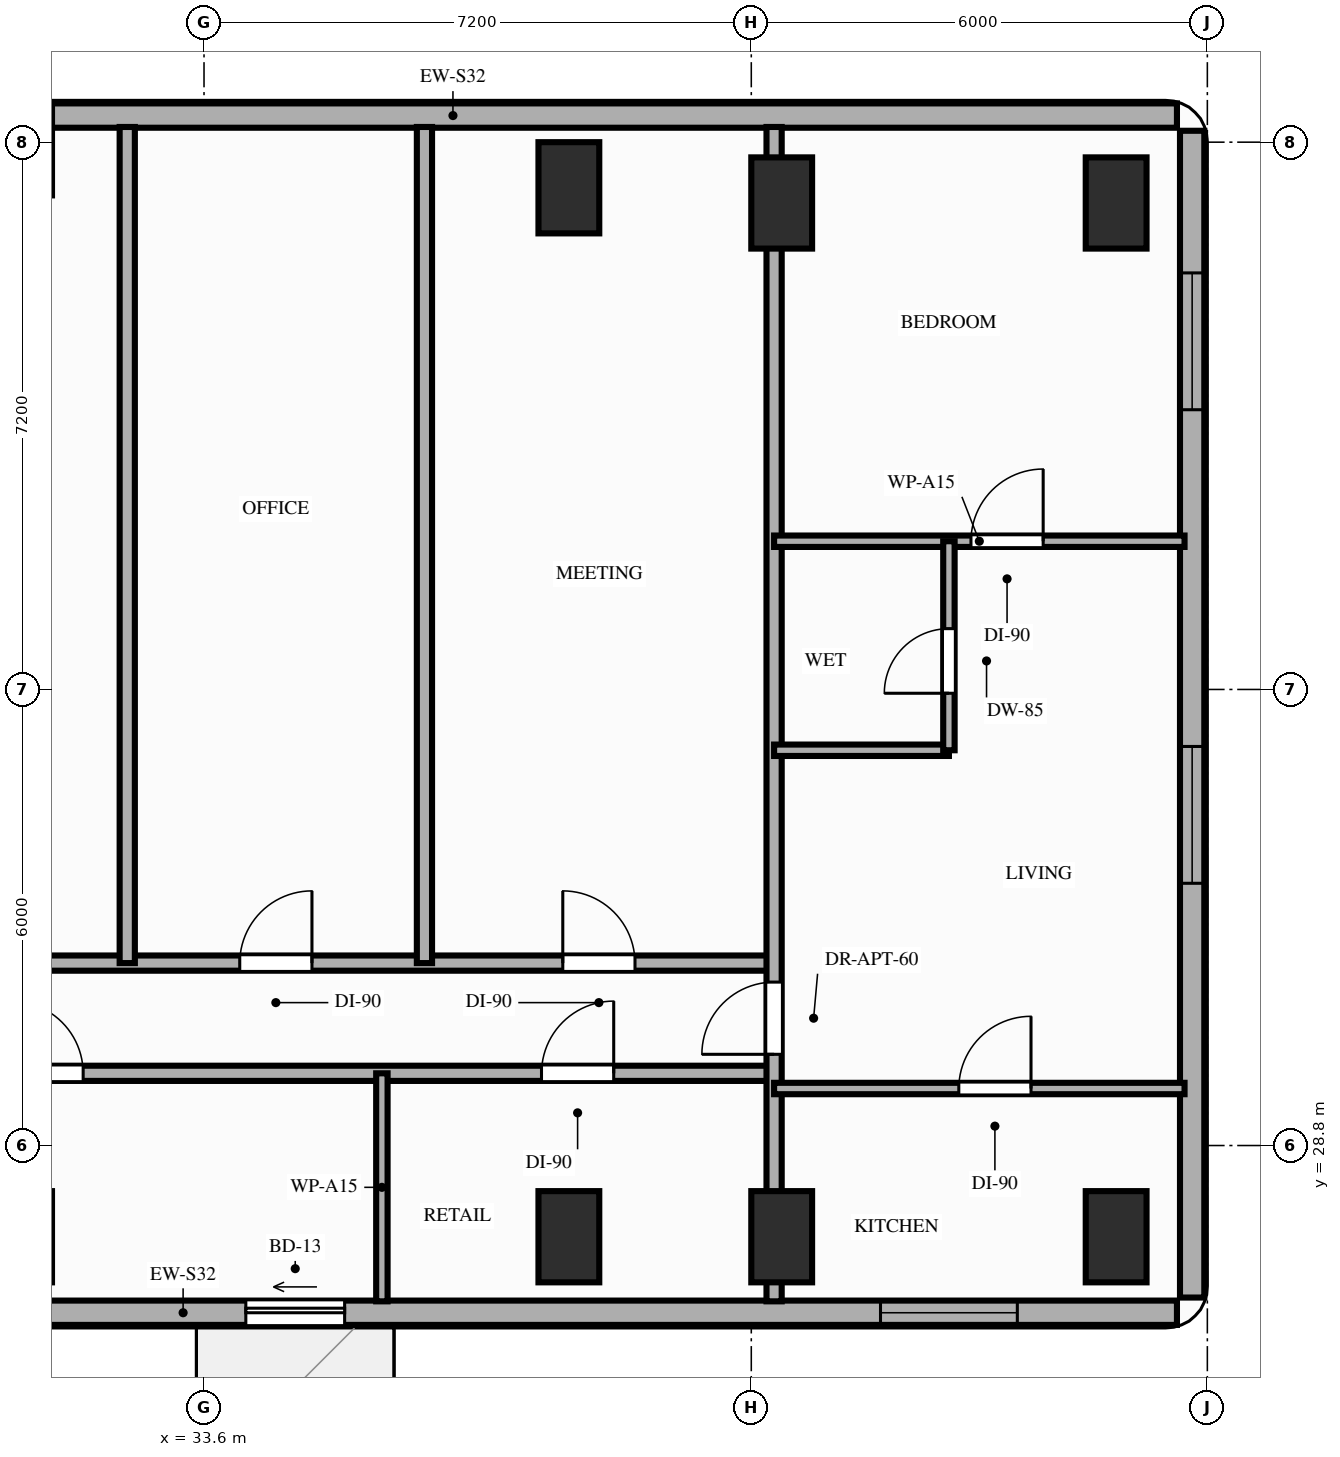
"""IFC4 building model, lengths in metres.
Left out: names, types, materials, properties, quantities, classifications, styles, units other than length and angle.
Written with IfcOpenShell. Run it as: python <this file> out.ifc"""

import sys

from ifc_helpers import new_model, si_unit, direction, frame, frame_2d, origin, origin_2d, place, context, subcontext, project, spatial, rectangle, extrude, element, fill, save


model = new_model("IFC4")
c1 = context("Model", 3, precision=1e-05, world=origin(), true_north=direction((0.0, 1.0)))
c2 = subcontext(c1, "Body", "Model", "MODEL_VIEW")
j1 = project(units=[si_unit("LENGTHUNIT", "METRE"), si_unit("PLANEANGLEUNIT", "RADIAN")], contexts=[c1])
p1 = place(None, origin())
s1 = spatial("IfcSite", under=j1, at=p1, CompositionType="ELEMENT")
p2 = place(p1, origin())
s2 = spatial("IfcBuilding", under=s1, at=p2, CompositionType="ELEMENT")
p3 = place(p2, frame((0.0, 0.0, 96.2)))
s3 = spatial("IfcBuildingStorey", under=s2, at=p3, CompositionType="ELEMENT", Elevation=96.2)
for number, where, z_axis, x_axis in (
    (1, (38.4, 27.6, 0.0), (0.0, 0.0, 1.0), (1.0, 0.0, 0.0)),
    (2, (38.4, 41.4, 0.0), (0.0, 0.0, 1.0), (1.0, 0.0, 0.0)),
    (3, (41.2, 27.6, 0.0), (0.0, 0.0, 1.0), (1.0, 0.0, 0.0)),
    (4, (41.2, 41.2, 0.0), (0.0, 0.0, 1.0), (1.0, 0.0, 0.0)),
    (5, (45.6, 27.6, 0.0), (0.0, 0.0, 1.0), (1.0, 0.0, 0.0)),
    (6, (45.6, 41.2, 0.0), (0.0, 0.0, 1.0), (1.0, 0.0, 0.0)),
):
    element("IfcColumn", number, at=place(p3, frame(where, z_axis=z_axis, x_axis=x_axis)), inside=s3, PredefinedType="COLUMN", context=c2, shape_type="SweptSolid", body=[
        extrude(rectangle(XDim=0.8, YDim=1.2, at=origin_2d()), origin(), (0.0, 0.0, 1.0), 3.2),
    ])
p4 = place(p3, frame((46.4, 42.35, 0.0), z_axis=(0.0, 0.0, 1.0), x_axis=(-1.0, 0.0, 0.0)))
e7 = element("IfcWall", 7, at=p4, inside=s3, PredefinedType="STANDARD", context=c2, shape_type="SweptSolid", body=[
    extrude(rectangle(XDim=19.05, YDim=0.32, at=frame_2d((9.525, 0.0))), origin(), (0.0, 0.0, 1.0), 2.41),
])
p5 = place(p3, frame((20.25, 26.6, 0.0), z_axis=(0.0, 0.0, 1.0), x_axis=(1.0, 0.0, 0.0)))
e8 = element("IfcWall", 8, at=p5, inside=s3, PredefinedType="STANDARD", context=c2, shape_type="SweptSolid", body=[
    extrude(rectangle(XDim=26.15, YDim=0.32, at=frame_2d((13.075, 0.0))), origin(), (0.0, 0.0, 1.0), 2.71),
])
p6 = place(p5, frame((13.9, 0.0, 0.0)))
e9 = element("IfcOpeningElement", 9, at=p6, cuts=e8, PredefinedType="OPENING", context=c2, shape_type="SweptSolid", body=[
    extrude(rectangle(XDim=1.3, YDim=2.08, at=frame_2d((0.65, 1.04))), frame((0.0, 0.17, 0.0), z_axis=(0.0, -1.0, 0.0), x_axis=(1.0, 0.0, 0.0)), (0.0, 0.0, 1.0), 0.34),
])
p7 = place(p5, frame((2.25, 0.0, 0.85)))
e10 = element("IfcOpeningElement", 10, at=p7, cuts=e8, PredefinedType="OPENING", context=c2, shape_type="SweptSolid", body=[
    extrude(rectangle(XDim=1.8, YDim=1.61, at=frame_2d((0.9, 0.805))), frame((0.0, 0.17, 0.0), z_axis=(0.0, -1.0, 0.0), x_axis=(1.0, 0.0, 0.0)), (0.0, 0.0, 1.0), 0.34),
])
p8 = place(p5, frame((7.75, 0.0, 0.85)))
e11 = element("IfcOpeningElement", 11, at=p8, cuts=e8, PredefinedType="OPENING", context=c2, shape_type="SweptSolid", body=[
    extrude(rectangle(XDim=1.8, YDim=1.61, at=frame_2d((0.9, 0.805))), frame((0.0, 0.17, 0.0), z_axis=(0.0, -1.0, 0.0), x_axis=(1.0, 0.0, 0.0)), (0.0, 0.0, 1.0), 0.34),
])
p9 = place(p5, frame((22.25, 0.0, 0.85)))
e12 = element("IfcOpeningElement", 12, at=p9, cuts=e8, PredefinedType="OPENING", context=c2, shape_type="SweptSolid", body=[
    extrude(rectangle(XDim=1.8, YDim=1.61, at=frame_2d((0.9, 0.805))), frame((0.0, 0.17, 0.0), z_axis=(0.0, -1.0, 0.0), x_axis=(1.0, 0.0, 0.0)), (0.0, 0.0, 1.0), 0.34),
])
p10 = place(p3, frame((46.6, 26.8, 0.0), z_axis=(0.0, 0.0, 1.0), x_axis=(0.0, 1.0, 0.0)))
e13 = element("IfcWall", 13, at=p10, inside=s3, PredefinedType="STANDARD", context=c2, shape_type="SweptSolid", body=[
    extrude(rectangle(XDim=15.35, YDim=0.32, at=frame_2d((7.675, 0.0))), origin(), (0.0, 0.0, 1.0), 3.02),
])
p11 = place(p10, frame((5.45, 0.0, 0.85)))
e14 = element("IfcOpeningElement", 14, at=p11, cuts=e13, PredefinedType="OPENING", context=c2, shape_type="SweptSolid", body=[
    extrude(rectangle(XDim=1.8, YDim=1.75, at=frame_2d((0.9, 0.875))), frame((0.0, 0.17, 0.0), z_axis=(0.0, -1.0, 0.0), x_axis=(1.0, 0.0, 0.0)), (0.0, 0.0, 1.0), 0.34),
])
p12 = place(p10, frame((11.68, 0.0, 0.85)))
e15 = element("IfcOpeningElement", 15, at=p12, cuts=e13, PredefinedType="OPENING", context=c2, shape_type="SweptSolid", body=[
    extrude(rectangle(XDim=1.8, YDim=1.75, at=frame_2d((0.9, 0.875))), frame((0.0, 0.17, 0.0), z_axis=(0.0, -1.0, 0.0), x_axis=(1.0, 0.0, 0.0)), (0.0, 0.0, 1.0), 0.34),
])
p13 = place(p3, frame((27.15, 29.75, 0.0), z_axis=(0.0, 0.0, 1.0), x_axis=(1.0, 0.0, 0.0)))
e16 = element("IfcWall", 16, at=p13, inside=s3, PredefinedType="PARTITIONING", context=c2, shape_type="SweptSolid", body=[
    extrude(rectangle(XDim=13.95, YDim=0.2, at=frame_2d((6.975, 0.0))), origin(), (0.0, 0.0, 1.0), 2.41),
])
p14 = place(p13, frame((3.91, 0.0, 0.0)))
e17 = element("IfcOpeningElement", 17, at=p14, cuts=e16, PredefinedType="OPENING", context=c2, shape_type="SweptSolid", body=[
    extrude(rectangle(XDim=0.95, YDim=2.15, at=frame_2d((0.475, 1.075))), frame((0.0, 0.11, 0.0), z_axis=(0.0, -1.0, 0.0), x_axis=(1.0, 0.0, 0.0)), (0.0, 0.0, 1.0), 0.22),
])
p15 = place(p13, frame((10.89, 0.0, 0.0)))
e18 = element("IfcOpeningElement", 18, at=p15, cuts=e16, PredefinedType="OPENING", context=c2, shape_type="SweptSolid", body=[
    extrude(rectangle(XDim=0.95, YDim=2.15, at=frame_2d((0.475, 1.075))), frame((0.0, 0.11, 0.0), z_axis=(0.0, -1.0, 0.0), x_axis=(1.0, 0.0, 0.0)), (0.0, 0.0, 1.0), 0.22),
])
p16 = place(p3, frame((27.15, 31.2, 0.0), z_axis=(0.0, 0.0, 1.0), x_axis=(1.0, 0.0, 0.0)))
e19 = element("IfcWall", 19, at=p16, inside=s3, PredefinedType="PARTITIONING", context=c2, shape_type="SweptSolid", body=[
    extrude(rectangle(XDim=13.95, YDim=0.2, at=frame_2d((6.975, 0.0))), origin(), (0.0, 0.0, 1.0), 2.41),
])
p17 = place(p16, frame((2.24, 0.0, 0.0)))
e20 = element("IfcOpeningElement", 20, at=p17, cuts=e19, PredefinedType="OPENING", context=c2, shape_type="SweptSolid", body=[
    extrude(rectangle(XDim=0.95, YDim=2.15, at=frame_2d((0.475, 1.075))), frame((0.0, 0.11, 0.0), z_axis=(0.0, -1.0, 0.0), x_axis=(1.0, 0.0, 0.0)), (0.0, 0.0, 1.0), 0.22),
])
p18 = place(p16, frame((6.92, 0.0, 0.0)))
e21 = element("IfcOpeningElement", 21, at=p18, cuts=e19, PredefinedType="OPENING", context=c2, shape_type="SweptSolid", body=[
    extrude(rectangle(XDim=0.95, YDim=2.15, at=frame_2d((0.475, 1.075))), frame((0.0, 0.11, 0.0), z_axis=(0.0, -1.0, 0.0), x_axis=(1.0, 0.0, 0.0)), (0.0, 0.0, 1.0), 0.22),
])
p19 = place(p16, frame((11.17, 0.0, 0.0)))
e22 = element("IfcOpeningElement", 22, at=p19, cuts=e19, PredefinedType="OPENING", context=c2, shape_type="SweptSolid", body=[
    extrude(rectangle(XDim=0.95, YDim=2.15, at=frame_2d((0.475, 1.075))), frame((0.0, 0.11, 0.0), z_axis=(0.0, -1.0, 0.0), x_axis=(1.0, 0.0, 0.0)), (0.0, 0.0, 1.0), 0.22),
])
p20 = place(p3, frame((41.1, 26.75, 0.0), z_axis=(0.0, 0.0, 1.0), x_axis=(0.0, 1.0, 0.0)))
e23 = element("IfcWall", 23, at=p20, inside=s3, PredefinedType="PARTITIONING", context=c2, shape_type="SweptSolid", body=[
    extrude(rectangle(XDim=15.45, YDim=0.2, at=frame_2d((7.725, 0.0))), origin(), (0.0, 0.0, 1.0), 2.41),
])
p21 = place(p20, frame((3.25, 0.0, 0.0)))
e24 = element("IfcOpeningElement", 24, at=p21, cuts=e23, PredefinedType="OPENING", context=c2, shape_type="SweptSolid", body=[
    extrude(rectangle(XDim=0.95, YDim=2.15, at=frame_2d((0.475, 1.075))), frame((0.0, 0.11, 0.0), z_axis=(0.0, -1.0, 0.0), x_axis=(1.0, 0.0, 0.0)), (0.0, 0.0, 1.0), 0.22),
])
p22 = place(p3, frame((41.1, 29.55, 0.0), z_axis=(0.0, 0.0, 1.0), x_axis=(1.0, 0.0, 0.0)))
e25 = element("IfcWall", 25, at=p22, inside=s3, PredefinedType="PARTITIONING", context=c2, shape_type="SweptSolid", body=[
    extrude(rectangle(XDim=5.4, YDim=0.15, at=frame_2d((2.7, 0.0))), origin(), (0.0, 0.0, 1.0), 2.41),
])
p23 = place(p22, frame((2.43, 0.0, 0.0)))
e26 = element("IfcOpeningElement", 26, at=p23, cuts=e25, PredefinedType="OPENING", context=c2, shape_type="SweptSolid", body=[
    extrude(rectangle(XDim=0.95, YDim=2.15, at=frame_2d((0.475, 1.075))), frame((0.0, 0.085, 0.0), z_axis=(0.0, -1.0, 0.0), x_axis=(1.0, 0.0, 0.0)), (0.0, 0.0, 1.0), 0.17),
])
p24 = place(p3, frame((41.1, 36.75, 0.0), z_axis=(0.0, 0.0, 1.0), x_axis=(1.0, 0.0, 0.0)))
e27 = element("IfcWall", 27, at=p24, inside=s3, PredefinedType="PARTITIONING", context=c2, shape_type="SweptSolid", body=[
    extrude(rectangle(XDim=5.4, YDim=0.15, at=frame_2d((2.7, 0.0))), origin(), (0.0, 0.0, 1.0), 2.41),
])
p25 = place(p24, frame((2.59, 0.0, 0.0)))
e28 = element("IfcOpeningElement", 28, at=p25, cuts=e27, PredefinedType="OPENING", context=c2, shape_type="SweptSolid", body=[
    extrude(rectangle(XDim=0.95, YDim=2.15, at=frame_2d((0.475, 1.075))), frame((0.0, 0.085, 0.0), z_axis=(0.0, -1.0, 0.0), x_axis=(1.0, 0.0, 0.0)), (0.0, 0.0, 1.0), 0.17),
])
p26 = place(p3, frame((41.1, 34.0, 0.0), z_axis=(0.0, 0.0, 1.0), x_axis=(1.0, 0.0, 0.0)))
e29 = element("IfcWall", 29, at=p26, inside=s3, PredefinedType="PARTITIONING", context=c2, shape_type="SweptSolid", body=[
    extrude(rectangle(XDim=2.3, YDim=0.15, at=frame_2d((1.15, 0.0))), origin(), (0.0, 0.0, 1.0), 2.41),
])
p27 = place(p3, frame((43.4, 34.0, 0.0), z_axis=(0.0, 0.0, 1.0), x_axis=(0.0, 1.0, 0.0)))
e30 = element("IfcWall", 30, at=p27, inside=s3, PredefinedType="PARTITIONING", context=c2, shape_type="SweptSolid", body=[
    extrude(rectangle(XDim=2.75, YDim=0.15, at=frame_2d((1.375, 0.0))), origin(), (0.0, 0.0, 1.0), 2.6),
])
p28 = place(p27, frame((0.75, 0.0, 0.0)))
e31 = element("IfcOpeningElement", 31, at=p28, cuts=e30, PredefinedType="OPENING", context=c2, shape_type="SweptSolid", body=[
    extrude(rectangle(XDim=0.85, YDim=2.1, at=frame_2d((0.425, 1.05))), frame((0.0, 0.085, 0.0), z_axis=(0.0, -1.0, 0.0), x_axis=(1.0, 0.0, 0.0)), (0.0, 0.0, 1.0), 0.17),
])
p29 = place(p3, frame((35.94, 26.75, 0.0), z_axis=(0.0, 0.0, 1.0), x_axis=(0.0, 1.0, 0.0)))
e32 = element("IfcWall", 32, at=p29, inside=s3, PredefinedType="PARTITIONING", context=c2, shape_type="SweptSolid", body=[
    extrude(rectangle(XDim=3.0, YDim=0.15, at=frame_2d((1.5, 0.0))), origin(), (0.0, 0.0, 1.0), 2.41),
])
for number, where, z_axis, x_axis in (
    (33, (32.59, 31.2, 0.0), (0.0, 0.0, 1.0), (0.0, 1.0, 0.0)),
    (34, (36.5, 31.2, 0.0), (0.0, 0.0, 1.0), (0.0, 1.0, 0.0)),
):
    element("IfcWall", number, at=place(p3, frame(where, z_axis=z_axis, x_axis=x_axis)), inside=s3, PredefinedType="PARTITIONING", context=c2, shape_type="SweptSolid", body=[
        extrude(rectangle(XDim=11.0, YDim=0.2, at=frame_2d((5.5, 0.0))), origin(), (0.0, 0.0, 1.0), 2.41),
    ])
p30 = place(p6, origin())
e35 = element("IfcDoor", 35, at=p30, inside=s3, OperationType="SLIDING_TO_LEFT", PredefinedType="DOOR", context=c2, shape_type="SweptSolid", body=[
    extrude(rectangle(XDim=1.3, YDim=2.08, at=frame_2d((0.65, 1.04))), frame((0.0, 0.025, 0.0), z_axis=(0.0, -1.0, 0.0), x_axis=(1.0, 0.0, 0.0)), (0.0, 0.0, 1.0), 0.05),
])
fill(e9, e35)
p31 = place(p11, origin())
e36 = element("IfcWindow", 36, at=p31, inside=s3, PartitioningType="SINGLE_PANEL", PredefinedType="WINDOW", context=c2, shape_type="SweptSolid", body=[
    extrude(rectangle(XDim=1.8, YDim=1.75, at=frame_2d((0.9, 0.875))), frame((0.0, 0.03, 0.0), z_axis=(0.0, -1.0, 0.0), x_axis=(1.0, 0.0, 0.0)), (0.0, 0.0, 1.0), 0.06),
])
fill(e14, e36)
p32 = place(p12, origin())
e37 = element("IfcWindow", 37, at=p32, inside=s3, PartitioningType="SINGLE_PANEL", PredefinedType="WINDOW", context=c2, shape_type="SweptSolid", body=[
    extrude(rectangle(XDim=1.8, YDim=1.75, at=frame_2d((0.9, 0.875))), frame((0.0, 0.03, 0.0), z_axis=(0.0, -1.0, 0.0), x_axis=(1.0, 0.0, 0.0)), (0.0, 0.0, 1.0), 0.06),
])
fill(e15, e37)
p33 = place(p9, origin())
e38 = element("IfcWindow", 38, at=p33, inside=s3, PartitioningType="SINGLE_PANEL", PredefinedType="WINDOW", context=c2, shape_type="SweptSolid", body=[
    extrude(rectangle(XDim=1.8, YDim=1.61, at=frame_2d((0.9, 0.805))), frame((0.0, 0.03, 0.0), z_axis=(0.0, -1.0, 0.0), x_axis=(1.0, 0.0, 0.0)), (0.0, 0.0, 1.0), 0.06),
])
fill(e12, e38)
p34 = place(p21, origin())
e39 = element("IfcDoor", 39, at=p34, inside=s3, OperationType="SINGLE_SWING_LEFT", PredefinedType="DOOR", context=c2, shape_type="SweptSolid", body=[
    extrude(rectangle(XDim=0.95, YDim=2.15, at=frame_2d((0.475, 1.075))), frame((0.0, 0.025, 0.0), z_axis=(0.0, -1.0, 0.0), x_axis=(1.0, 0.0, 0.0)), (0.0, 0.0, 1.0), 0.05),
])
fill(e24, e39)
p35 = place(p25, origin())
e40 = element("IfcDoor", 40, at=p35, inside=s3, OperationType="SINGLE_SWING_RIGHT", PredefinedType="DOOR", context=c2, shape_type="SweptSolid", body=[
    extrude(rectangle(XDim=0.95, YDim=2.15, at=frame_2d((0.475, 1.075))), frame((0.0, 0.025, 0.0), z_axis=(0.0, -1.0, 0.0), x_axis=(1.0, 0.0, 0.0)), (0.0, 0.0, 1.0), 0.05),
])
fill(e28, e40)
p36 = place(p28, origin())
e41 = element("IfcDoor", 41, at=p36, inside=s3, OperationType="SINGLE_SWING_LEFT", PredefinedType="DOOR", context=c2, shape_type="SweptSolid", body=[
    extrude(rectangle(XDim=0.85, YDim=2.1, at=frame_2d((0.425, 1.05))), frame((0.0, 0.025, 0.0), z_axis=(0.0, -1.0, 0.0), x_axis=(1.0, 0.0, 0.0)), (0.0, 0.0, 1.0), 0.05),
])
fill(e31, e41)
p37 = place(p23, origin())
e42 = element("IfcDoor", 42, at=p37, inside=s3, OperationType="SINGLE_SWING_RIGHT", PredefinedType="DOOR", context=c2, shape_type="SweptSolid", body=[
    extrude(rectangle(XDim=0.95, YDim=2.15, at=frame_2d((0.475, 1.075))), frame((0.0, 0.025, 0.0), z_axis=(0.0, -1.0, 0.0), x_axis=(1.0, 0.0, 0.0)), (0.0, 0.0, 1.0), 0.05),
])
fill(e26, e42)
p38 = place(p14, origin())
e43 = element("IfcDoor", 43, at=p38, inside=s3, OperationType="SINGLE_SWING_LEFT", PredefinedType="DOOR", context=c2, shape_type="SweptSolid", body=[
    extrude(rectangle(XDim=0.95, YDim=2.15, at=frame_2d((0.475, 1.075))), frame((0.0, 0.025, 0.0), z_axis=(0.0, -1.0, 0.0), x_axis=(1.0, 0.0, 0.0)), (0.0, 0.0, 1.0), 0.05),
])
fill(e17, e43)
p39 = place(p15, origin())
e44 = element("IfcDoor", 44, at=p39, inside=s3, OperationType="SINGLE_SWING_RIGHT", PredefinedType="DOOR", context=c2, shape_type="SweptSolid", body=[
    extrude(rectangle(XDim=0.95, YDim=2.15, at=frame_2d((0.475, 1.075))), frame((0.0, 0.025, 0.0), z_axis=(0.0, -1.0, 0.0), x_axis=(1.0, 0.0, 0.0)), (0.0, 0.0, 1.0), 0.05),
])
fill(e18, e44)
p40 = place(p18, origin())
e45 = element("IfcDoor", 45, at=p40, inside=s3, OperationType="SINGLE_SWING_RIGHT", PredefinedType="DOOR", context=c2, shape_type="SweptSolid", body=[
    extrude(rectangle(XDim=0.95, YDim=2.15, at=frame_2d((0.475, 1.075))), frame((0.0, 0.025, 0.0), z_axis=(0.0, -1.0, 0.0), x_axis=(1.0, 0.0, 0.0)), (0.0, 0.0, 1.0), 0.05),
])
fill(e21, e45)
p41 = place(p19, origin())
e46 = element("IfcDoor", 46, at=p41, inside=s3, OperationType="SINGLE_SWING_LEFT", PredefinedType="DOOR", context=c2, shape_type="SweptSolid", body=[
    extrude(rectangle(XDim=0.95, YDim=2.15, at=frame_2d((0.475, 1.075))), frame((0.0, 0.025, 0.0), z_axis=(0.0, -1.0, 0.0), x_axis=(1.0, 0.0, 0.0)), (0.0, 0.0, 1.0), 0.05),
])
fill(e22, e46)
save(model, sys.argv[1])
